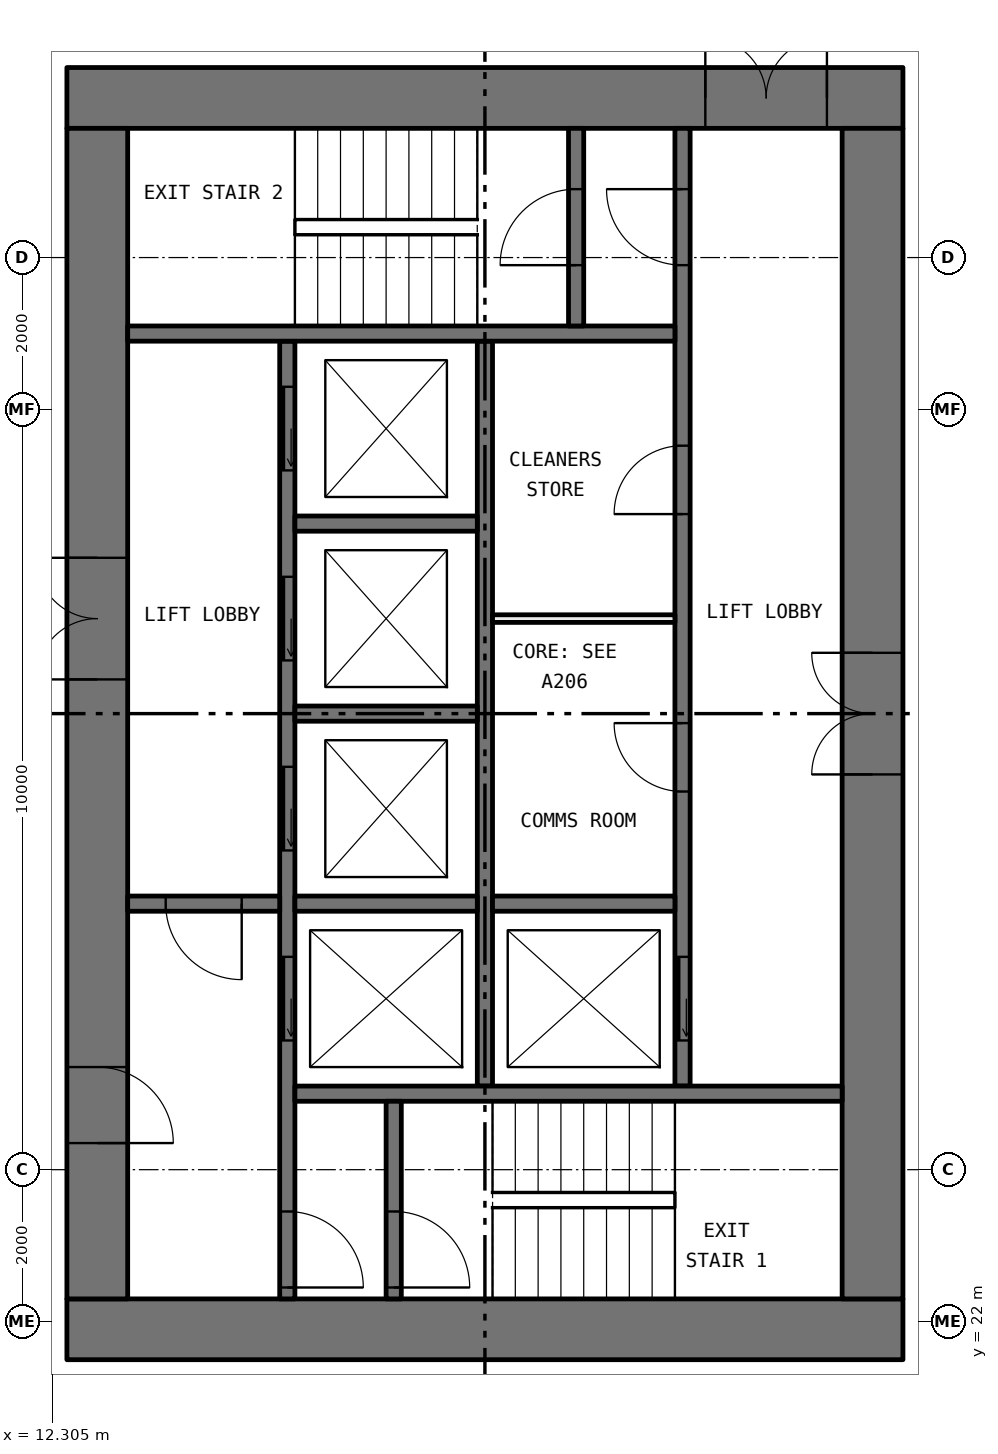
"""IFC4 building model, lengths in metres.
Left out: names, types, materials, properties, quantities, classifications, styles, units other than length and angle.
Written with IfcOpenShell. Run it as: python <this file> out.ifc"""

import sys

from ifc_helpers import new_model, si_unit, direction, frame, frame_2d, origin, place, context, subcontext, project, spatial, rectangle, extrude, element, fill, save


model = new_model("IFC4")
c1 = context("Model", 3, precision=1e-05, world=origin(), true_north=direction((0.0, 1.0)))
c2 = subcontext(c1, "Body", "Model", "MODEL_VIEW")
j1 = project(units=[si_unit("LENGTHUNIT", "METRE"), si_unit("PLANEANGLEUNIT", "RADIAN")], contexts=[c1])
p1 = place(None, origin())
s1 = spatial("IfcSite", under=j1, at=p1, CompositionType="ELEMENT")
p2 = place(p1, origin())
s2 = spatial("IfcBuilding", under=s1, at=p2, CompositionType="ELEMENT")
p3 = place(p2, frame((0.0, 0.0, 30.0)))
s3 = spatial("IfcBuildingStorey", under=s2, at=p3, CompositionType="ELEMENT", Elevation=30.0)
p4 = place(p3, frame((12.5, 21.9, 0.0), z_axis=(0.0, 0.0, 1.0), x_axis=(1.0, 0.0, 0.0)))
e1 = element("IfcWall", 1, at=p4, inside=s3, PredefinedType="SHEAR", context=c2, shape_type="SweptSolid", body=[
    extrude(rectangle(XDim=11.0, YDim=0.8, at=frame_2d((5.5, 0.0))), origin(), (0.0, 0.0, 1.0), 3.05),
])
p5 = place(p3, frame((12.5, 38.1, 0.0), z_axis=(0.0, 0.0, 1.0), x_axis=(1.0, 0.0, 0.0)))
e2 = element("IfcWall", 2, at=p5, inside=s3, PredefinedType="SHEAR", context=c2, shape_type="SweptSolid", body=[
    extrude(rectangle(XDim=11.0, YDim=0.8, at=frame_2d((5.5, 0.0))), origin(), (0.0, 0.0, 1.0), 3.05),
])
p6 = place(p5, frame((8.4, 0.0, 0.0)))
e3 = element("IfcOpeningElement", 3, at=p6, cuts=e2, PredefinedType="OPENING", context=c2, shape_type="SweptSolid", body=[
    extrude(rectangle(XDim=1.6, YDim=2.1, at=frame_2d((0.8, 1.05))), frame((0.0, 0.41, 0.0), z_axis=(0.0, -1.0, 0.0), x_axis=(1.0, 0.0, 0.0)), (0.0, 0.0, 1.0), 0.82),
])
p7 = place(p3, frame((12.9, 22.3, 0.0), z_axis=(0.0, 0.0, 1.0), x_axis=(0.0, 1.0, 0.0)))
e4 = element("IfcWall", 4, at=p7, inside=s3, PredefinedType="SHEAR", context=c2, shape_type="SweptSolid", body=[
    extrude(rectangle(XDim=15.4, YDim=0.8, at=frame_2d((7.7, 0.0))), origin(), (0.0, 0.0, 1.0), 3.05),
])
p8 = place(p7, frame((8.15, 0.0, 0.0)))
e5 = element("IfcOpeningElement", 5, at=p8, cuts=e4, PredefinedType="OPENING", context=c2, shape_type="SweptSolid", body=[
    extrude(rectangle(XDim=1.6, YDim=2.1, at=frame_2d((0.8, 1.05))), frame((0.0, 0.41, 0.0), z_axis=(0.0, -1.0, 0.0), x_axis=(1.0, 0.0, 0.0)), (0.0, 0.0, 1.0), 0.82),
])
p9 = place(p7, frame((2.05, 0.0, 0.0)))
e6 = element("IfcOpeningElement", 6, at=p9, cuts=e4, PredefinedType="OPENING", context=c2, shape_type="SweptSolid", body=[
    extrude(rectangle(XDim=1.0, YDim=2.1, at=frame_2d((0.5, 1.05))), frame((0.0, 0.41, 0.0), z_axis=(0.0, -1.0, 0.0), x_axis=(1.0, 0.0, 0.0)), (0.0, 0.0, 1.0), 0.82),
])
p10 = place(p3, frame((23.1, 22.3, 0.0), z_axis=(0.0, 0.0, 1.0), x_axis=(0.0, 1.0, 0.0)))
e7 = element("IfcWall", 7, at=p10, inside=s3, PredefinedType="SHEAR", context=c2, shape_type="SweptSolid", body=[
    extrude(rectangle(XDim=15.4, YDim=0.8, at=frame_2d((7.7, 0.0))), origin(), (0.0, 0.0, 1.0), 3.05),
])
p11 = place(p10, frame((6.9, 0.0, 0.0)))
e8 = element("IfcOpeningElement", 8, at=p11, cuts=e7, PredefinedType="OPENING", context=c2, shape_type="SweptSolid", body=[
    extrude(rectangle(XDim=1.6, YDim=2.1, at=frame_2d((0.8, 1.05))), frame((0.0, 0.41, 0.0), z_axis=(0.0, -1.0, 0.0), x_axis=(1.0, 0.0, 0.0)), (0.0, 0.0, 1.0), 0.82),
])
p12 = place(p3, frame((15.4, 22.3, 0.0), z_axis=(0.0, 0.0, 1.0), x_axis=(0.0, 1.0, 0.0)))
e9 = element("IfcWall", 9, at=p12, inside=s3, PredefinedType="SOLIDWALL", context=c2, shape_type="SweptSolid", body=[
    extrude(rectangle(XDim=12.6, YDim=0.2, at=frame_2d((6.3, 0.0))), origin(), (0.0, 0.0, 1.0), 3.05),
])
p13 = place(p12, frame((3.4, 0.0, 0.0)))
e10 = element("IfcOpeningElement", 10, at=p13, cuts=e9, PredefinedType="OPENING", context=c2, shape_type="SweptSolid", body=[
    extrude(rectangle(XDim=1.1, YDim=2.1, at=frame_2d((0.55, 1.05))), frame((0.0, 0.11, 0.0), z_axis=(0.0, -1.0, 0.0), x_axis=(1.0, 0.0, 0.0)), (0.0, 0.0, 1.0), 0.22),
])
p14 = place(p12, frame((5.9, 0.0, 0.0)))
e11 = element("IfcOpeningElement", 11, at=p14, cuts=e9, PredefinedType="OPENING", context=c2, shape_type="SweptSolid", body=[
    extrude(rectangle(XDim=1.1, YDim=2.1, at=frame_2d((0.55, 1.05))), frame((0.0, 0.11, 0.0), z_axis=(0.0, -1.0, 0.0), x_axis=(1.0, 0.0, 0.0)), (0.0, 0.0, 1.0), 0.22),
])
p15 = place(p12, frame((8.4, 0.0, 0.0)))
e12 = element("IfcOpeningElement", 12, at=p15, cuts=e9, PredefinedType="OPENING", context=c2, shape_type="SweptSolid", body=[
    extrude(rectangle(XDim=1.1, YDim=2.1, at=frame_2d((0.55, 1.05))), frame((0.0, 0.11, 0.0), z_axis=(0.0, -1.0, 0.0), x_axis=(1.0, 0.0, 0.0)), (0.0, 0.0, 1.0), 0.22),
])
p16 = place(p12, frame((10.9, 0.0, 0.0)))
e13 = element("IfcOpeningElement", 13, at=p16, cuts=e9, PredefinedType="OPENING", context=c2, shape_type="SweptSolid", body=[
    extrude(rectangle(XDim=1.1, YDim=2.1, at=frame_2d((0.55, 1.05))), frame((0.0, 0.11, 0.0), z_axis=(0.0, -1.0, 0.0), x_axis=(1.0, 0.0, 0.0)), (0.0, 0.0, 1.0), 0.22),
])
p17 = place(p12, frame((0.15, 0.0, 0.0)))
e14 = element("IfcOpeningElement", 14, at=p17, cuts=e9, PredefinedType="OPENING", context=c2, shape_type="SweptSolid", body=[
    extrude(rectangle(XDim=1.0, YDim=2.1, at=frame_2d((0.5, 1.05))), frame((0.0, 0.11, 0.0), z_axis=(0.0, -1.0, 0.0), x_axis=(1.0, 0.0, 0.0)), (0.0, 0.0, 1.0), 0.22),
])
p18 = place(p3, frame((20.6, 25.1, 0.0), z_axis=(0.0, 0.0, 1.0), x_axis=(0.0, 1.0, 0.0)))
e15 = element("IfcWall", 15, at=p18, inside=s3, PredefinedType="SOLIDWALL", context=c2, shape_type="SweptSolid", body=[
    extrude(rectangle(XDim=12.6, YDim=0.2, at=frame_2d((6.3, 0.0))), origin(), (0.0, 0.0, 1.0), 3.05),
])
p19 = place(p18, frame((0.6, 0.0, 0.0)))
e16 = element("IfcOpeningElement", 16, at=p19, cuts=e15, PredefinedType="OPENING", context=c2, shape_type="SweptSolid", body=[
    extrude(rectangle(XDim=1.1, YDim=2.1, at=frame_2d((0.55, 1.05))), frame((0.0, 0.11, 0.0), z_axis=(0.0, -1.0, 0.0), x_axis=(1.0, 0.0, 0.0)), (0.0, 0.0, 1.0), 0.22),
])
p20 = place(p18, frame((10.8, 0.0, 0.0)))
e17 = element("IfcOpeningElement", 17, at=p20, cuts=e15, PredefinedType="OPENING", context=c2, shape_type="SweptSolid", body=[
    extrude(rectangle(XDim=1.0, YDim=2.1, at=frame_2d((0.5, 1.05))), frame((0.0, 0.11, 0.0), z_axis=(0.0, -1.0, 0.0), x_axis=(1.0, 0.0, 0.0)), (0.0, 0.0, 1.0), 0.22),
])
p21 = place(p18, frame((3.875, 0.0, 0.0)))
e18 = element("IfcOpeningElement", 18, at=p21, cuts=e15, PredefinedType="OPENING", context=c2, shape_type="SweptSolid", body=[
    extrude(rectangle(XDim=0.9, YDim=2.1, at=frame_2d((0.45, 1.05))), frame((0.0, 0.11, 0.0), z_axis=(0.0, -1.0, 0.0), x_axis=(1.0, 0.0, 0.0)), (0.0, 0.0, 1.0), 0.22),
])
p22 = place(p18, frame((7.525, 0.0, 0.0)))
e19 = element("IfcOpeningElement", 19, at=p22, cuts=e15, PredefinedType="OPENING", context=c2, shape_type="SweptSolid", body=[
    extrude(rectangle(XDim=0.9, YDim=2.1, at=frame_2d((0.45, 1.05))), frame((0.0, 0.11, 0.0), z_axis=(0.0, -1.0, 0.0), x_axis=(1.0, 0.0, 0.0)), (0.0, 0.0, 1.0), 0.22),
])
p23 = place(p3, frame((18.0, 25.1, 0.0), z_axis=(0.0, 0.0, 1.0), x_axis=(0.0, 1.0, 0.0)))
e20 = element("IfcWall", 20, at=p23, inside=s3, PredefinedType="SOLIDWALL", context=c2, shape_type="SweptSolid", body=[
    extrude(rectangle(XDim=9.8, YDim=0.2, at=frame_2d((4.9, 0.0))), origin(), (0.0, 0.0, 1.0), 3.05),
])
for number, where, z_axis, x_axis in (
    (21, (15.5, 25.0, 0.0), (0.0, 0.0, 1.0), (1.0, 0.0, 0.0)),
    (22, (13.3, 35.0, 0.0), (0.0, 0.0, 1.0), (1.0, 0.0, 0.0)),
):
    element("IfcWall", number, at=place(p3, frame(where, z_axis=z_axis, x_axis=x_axis)), inside=s3, PredefinedType="SOLIDWALL", context=c2, shape_type="SweptSolid", body=[
        extrude(rectangle(XDim=7.2, YDim=0.2, at=frame_2d((3.6, 0.0))), origin(), (0.0, 0.0, 1.0), 3.05),
    ])
p24 = place(p3, frame((13.3, 27.5, 0.0), z_axis=(0.0, 0.0, 1.0), x_axis=(1.0, 0.0, 0.0)))
e23 = element("IfcWall", 23, at=p24, inside=s3, PredefinedType="SOLIDWALL", context=c2, shape_type="SweptSolid", body=[
    extrude(rectangle(XDim=2.0, YDim=0.2, at=frame_2d((1.0, 0.0))), origin(), (0.0, 0.0, 1.0), 3.05),
])
p25 = place(p24, frame((0.5, 0.0, 0.0)))
e24 = element("IfcOpeningElement", 24, at=p25, cuts=e23, PredefinedType="OPENING", context=c2, shape_type="SweptSolid", body=[
    extrude(rectangle(XDim=1.0, YDim=2.1, at=frame_2d((0.5, 1.05))), frame((0.0, 0.11, 0.0), z_axis=(0.0, -1.0, 0.0), x_axis=(1.0, 0.0, 0.0)), (0.0, 0.0, 1.0), 0.22),
])
p26 = place(p3, frame((16.8, 22.3, 0.0), z_axis=(0.0, 0.0, 1.0), x_axis=(0.0, 1.0, 0.0)))
e25 = element("IfcWall", 25, at=p26, inside=s3, PredefinedType="SOLIDWALL", context=c2, shape_type="SweptSolid", body=[
    extrude(rectangle(XDim=2.6, YDim=0.2, at=frame_2d((1.3, 0.0))), origin(), (0.0, 0.0, 1.0), 3.05),
])
p27 = place(p26, frame((0.15, 0.0, 0.0)))
e26 = element("IfcOpeningElement", 26, at=p27, cuts=e25, PredefinedType="OPENING", context=c2, shape_type="SweptSolid", body=[
    extrude(rectangle(XDim=1.0, YDim=2.1, at=frame_2d((0.5, 1.05))), frame((0.0, 0.11, 0.0), z_axis=(0.0, -1.0, 0.0), x_axis=(1.0, 0.0, 0.0)), (0.0, 0.0, 1.0), 0.22),
])
p28 = place(p3, frame((19.2, 35.1, 0.0), z_axis=(0.0, 0.0, 1.0), x_axis=(0.0, 1.0, 0.0)))
e27 = element("IfcWall", 27, at=p28, inside=s3, PredefinedType="SOLIDWALL", context=c2, shape_type="SweptSolid", body=[
    extrude(rectangle(XDim=2.6, YDim=0.2, at=frame_2d((1.3, 0.0))), origin(), (0.0, 0.0, 1.0), 3.05),
])
p29 = place(p28, frame((0.8, 0.0, 0.0)))
e28 = element("IfcOpeningElement", 28, at=p29, cuts=e27, PredefinedType="OPENING", context=c2, shape_type="SweptSolid", body=[
    extrude(rectangle(XDim=1.0, YDim=2.1, at=frame_2d((0.5, 1.05))), frame((0.0, 0.11, 0.0), z_axis=(0.0, -1.0, 0.0), x_axis=(1.0, 0.0, 0.0)), (0.0, 0.0, 1.0), 0.22),
])
for number, where, z_axis, x_axis in (
    (29, (15.5, 27.5, 0.0), (0.0, 0.0, 1.0), (1.0, 0.0, 0.0)),
    (30, (15.5, 30.0, 0.0), (0.0, 0.0, 1.0), (1.0, 0.0, 0.0)),
    (31, (15.5, 32.5, 0.0), (0.0, 0.0, 1.0), (1.0, 0.0, 0.0)),
    (32, (18.1, 27.5, 0.0), (0.0, 0.0, 1.0), (1.0, 0.0, 0.0)),
):
    element("IfcWall", number, at=place(p3, frame(where, z_axis=z_axis, x_axis=x_axis)), inside=s3, PredefinedType="SOLIDWALL", context=c2, shape_type="SweptSolid", body=[
        extrude(rectangle(XDim=2.4, YDim=0.2, at=frame_2d((1.2, 0.0))), origin(), (0.0, 0.0, 1.0), 3.05),
    ])
p30 = place(p3, frame((18.1, 31.25, 0.0), z_axis=(0.0, 0.0, 1.0), x_axis=(1.0, 0.0, 0.0)))
e33 = element("IfcWall", 33, at=p30, inside=s3, PredefinedType="PARTITIONING", context=c2, shape_type="SweptSolid", body=[
    extrude(rectangle(XDim=2.4, YDim=0.1, at=frame_2d((1.2, 0.0))), origin(), (0.0, 0.0, 1.0), 3.05),
])
p31 = place(p19, origin())
e34 = element("IfcDoor", 34, at=p31, inside=s3, OperationType="SLIDING_TO_LEFT", PredefinedType="DOOR", context=c2, shape_type="SweptSolid", body=[
    extrude(rectangle(XDim=1.1, YDim=2.1, at=frame_2d((0.55, 1.05))), frame((0.0, 0.025, 0.0), z_axis=(0.0, -1.0, 0.0), x_axis=(1.0, 0.0, 0.0)), (0.0, 0.0, 1.0), 0.05),
])
fill(e16, e34)
p32 = place(p13, origin())
e35 = element("IfcDoor", 35, at=p32, inside=s3, OperationType="SLIDING_TO_LEFT", PredefinedType="DOOR", context=c2, shape_type="SweptSolid", body=[
    extrude(rectangle(XDim=1.1, YDim=2.1, at=frame_2d((0.55, 1.05))), frame((0.0, 0.025, 0.0), z_axis=(0.0, -1.0, 0.0), x_axis=(1.0, 0.0, 0.0)), (0.0, 0.0, 1.0), 0.05),
])
fill(e10, e35)
p33 = place(p14, origin())
e36 = element("IfcDoor", 36, at=p33, inside=s3, OperationType="SLIDING_TO_LEFT", PredefinedType="DOOR", context=c2, shape_type="SweptSolid", body=[
    extrude(rectangle(XDim=1.1, YDim=2.1, at=frame_2d((0.55, 1.05))), frame((0.0, 0.025, 0.0), z_axis=(0.0, -1.0, 0.0), x_axis=(1.0, 0.0, 0.0)), (0.0, 0.0, 1.0), 0.05),
])
fill(e11, e36)
p34 = place(p15, origin())
e37 = element("IfcDoor", 37, at=p34, inside=s3, OperationType="SLIDING_TO_LEFT", PredefinedType="DOOR", context=c2, shape_type="SweptSolid", body=[
    extrude(rectangle(XDim=1.1, YDim=2.1, at=frame_2d((0.55, 1.05))), frame((0.0, 0.025, 0.0), z_axis=(0.0, -1.0, 0.0), x_axis=(1.0, 0.0, 0.0)), (0.0, 0.0, 1.0), 0.05),
])
fill(e12, e37)
p35 = place(p16, origin())
e38 = element("IfcDoor", 38, at=p35, inside=s3, OperationType="SLIDING_TO_LEFT", PredefinedType="DOOR", context=c2, shape_type="SweptSolid", body=[
    extrude(rectangle(XDim=1.1, YDim=2.1, at=frame_2d((0.55, 1.05))), frame((0.0, 0.025, 0.0), z_axis=(0.0, -1.0, 0.0), x_axis=(1.0, 0.0, 0.0)), (0.0, 0.0, 1.0), 0.05),
])
fill(e13, e38)
p36 = place(p27, frame((1.0, 0.0, 0.0), x_axis=(-1.0, 0.0, 0.0)))
e39 = element("IfcDoor", 39, at=p36, inside=s3, OperationType="SINGLE_SWING_LEFT", PredefinedType="DOOR", context=c2, shape_type="SweptSolid", body=[
    extrude(rectangle(XDim=1.0, YDim=2.1, at=frame_2d((0.5, 1.05))), frame((0.0, 0.025, 0.0), z_axis=(0.0, -1.0, 0.0), x_axis=(1.0, 0.0, 0.0)), (0.0, 0.0, 1.0), 0.05),
])
fill(e26, e39)
p37 = place(p17, frame((1.0, 0.0, 0.0), x_axis=(-1.0, 0.0, 0.0)))
e40 = element("IfcDoor", 40, at=p37, inside=s3, OperationType="SINGLE_SWING_LEFT", PredefinedType="DOOR", context=c2, shape_type="SweptSolid", body=[
    extrude(rectangle(XDim=1.0, YDim=2.1, at=frame_2d((0.5, 1.05))), frame((0.0, 0.025, 0.0), z_axis=(0.0, -1.0, 0.0), x_axis=(1.0, 0.0, 0.0)), (0.0, 0.0, 1.0), 0.05),
])
fill(e14, e40)
p38 = place(p20, origin())
e41 = element("IfcDoor", 41, at=p38, inside=s3, OperationType="SINGLE_SWING_LEFT", PredefinedType="DOOR", context=c2, shape_type="SweptSolid", body=[
    extrude(rectangle(XDim=1.0, YDim=2.1, at=frame_2d((0.5, 1.05))), frame((0.0, 0.025, 0.0), z_axis=(0.0, -1.0, 0.0), x_axis=(1.0, 0.0, 0.0)), (0.0, 0.0, 1.0), 0.05),
])
fill(e17, e41)
p39 = place(p29, origin())
e42 = element("IfcDoor", 42, at=p39, inside=s3, OperationType="SINGLE_SWING_RIGHT", PredefinedType="DOOR", context=c2, shape_type="SweptSolid", body=[
    extrude(rectangle(XDim=1.0, YDim=2.1, at=frame_2d((0.5, 1.05))), frame((0.0, 0.025, 0.0), z_axis=(0.0, -1.0, 0.0), x_axis=(1.0, 0.0, 0.0)), (0.0, 0.0, 1.0), 0.05),
])
fill(e28, e42)
p40 = place(p25, frame((1.0, 0.0, 0.0), x_axis=(-1.0, 0.0, 0.0)))
e43 = element("IfcDoor", 43, at=p40, inside=s3, OperationType="SINGLE_SWING_RIGHT", PredefinedType="DOOR", context=c2, shape_type="SweptSolid", body=[
    extrude(rectangle(XDim=1.0, YDim=2.1, at=frame_2d((0.5, 1.05))), frame((0.0, 0.025, 0.0), z_axis=(0.0, -1.0, 0.0), x_axis=(1.0, 0.0, 0.0)), (0.0, 0.0, 1.0), 0.05),
])
fill(e24, e43)
p41 = place(p8, origin())
e44 = element("IfcDoor", 44, at=p41, inside=s3, OperationType="DOUBLE_DOOR_SINGLE_SWING", PredefinedType="DOOR", context=c2, shape_type="SweptSolid", body=[
    extrude(rectangle(XDim=1.6, YDim=2.1, at=frame_2d((0.8, 1.05))), frame((0.0, 0.025, 0.0), z_axis=(0.0, -1.0, 0.0), x_axis=(1.0, 0.0, 0.0)), (0.0, 0.0, 1.0), 0.05),
])
fill(e5, e44)
p42 = place(p9, frame((1.0, 0.0, 0.0), x_axis=(-1.0, 0.0, 0.0)))
e45 = element("IfcDoor", 45, at=p42, inside=s3, OperationType="SINGLE_SWING_LEFT", PredefinedType="DOOR", context=c2, shape_type="SweptSolid", body=[
    extrude(rectangle(XDim=1.0, YDim=2.1, at=frame_2d((0.5, 1.05))), frame((0.0, 0.025, 0.0), z_axis=(0.0, -1.0, 0.0), x_axis=(1.0, 0.0, 0.0)), (0.0, 0.0, 1.0), 0.05),
])
fill(e6, e45)
p43 = place(p6, origin())
e46 = element("IfcDoor", 46, at=p43, inside=s3, OperationType="DOUBLE_DOOR_SINGLE_SWING", PredefinedType="DOOR", context=c2, shape_type="SweptSolid", body=[
    extrude(rectangle(XDim=1.6, YDim=2.1, at=frame_2d((0.8, 1.05))), frame((0.0, 0.025, 0.0), z_axis=(0.0, -1.0, 0.0), x_axis=(1.0, 0.0, 0.0)), (0.0, 0.0, 1.0), 0.05),
])
fill(e3, e46)
p44 = place(p11, origin())
e47 = element("IfcDoor", 47, at=p44, inside=s3, OperationType="DOUBLE_DOOR_SINGLE_SWING", PredefinedType="DOOR", context=c2, shape_type="SweptSolid", body=[
    extrude(rectangle(XDim=1.6, YDim=2.1, at=frame_2d((0.8, 1.05))), frame((0.0, 0.025, 0.0), z_axis=(0.0, -1.0, 0.0), x_axis=(1.0, 0.0, 0.0)), (0.0, 0.0, 1.0), 0.05),
])
fill(e8, e47)
p45 = place(p21, origin())
e48 = element("IfcDoor", 48, at=p45, inside=s3, OperationType="SINGLE_SWING_LEFT", PredefinedType="DOOR", context=c2, shape_type="SweptSolid", body=[
    extrude(rectangle(XDim=0.9, YDim=2.1, at=frame_2d((0.45, 1.05))), frame((0.0, 0.025, 0.0), z_axis=(0.0, -1.0, 0.0), x_axis=(1.0, 0.0, 0.0)), (0.0, 0.0, 1.0), 0.05),
])
fill(e18, e48)
p46 = place(p22, origin())
e49 = element("IfcDoor", 49, at=p46, inside=s3, OperationType="SINGLE_SWING_RIGHT", PredefinedType="DOOR", context=c2, shape_type="SweptSolid", body=[
    extrude(rectangle(XDim=0.9, YDim=2.1, at=frame_2d((0.45, 1.05))), frame((0.0, 0.025, 0.0), z_axis=(0.0, -1.0, 0.0), x_axis=(1.0, 0.0, 0.0)), (0.0, 0.0, 1.0), 0.05),
])
fill(e19, e49)
save(model, sys.argv[1])
